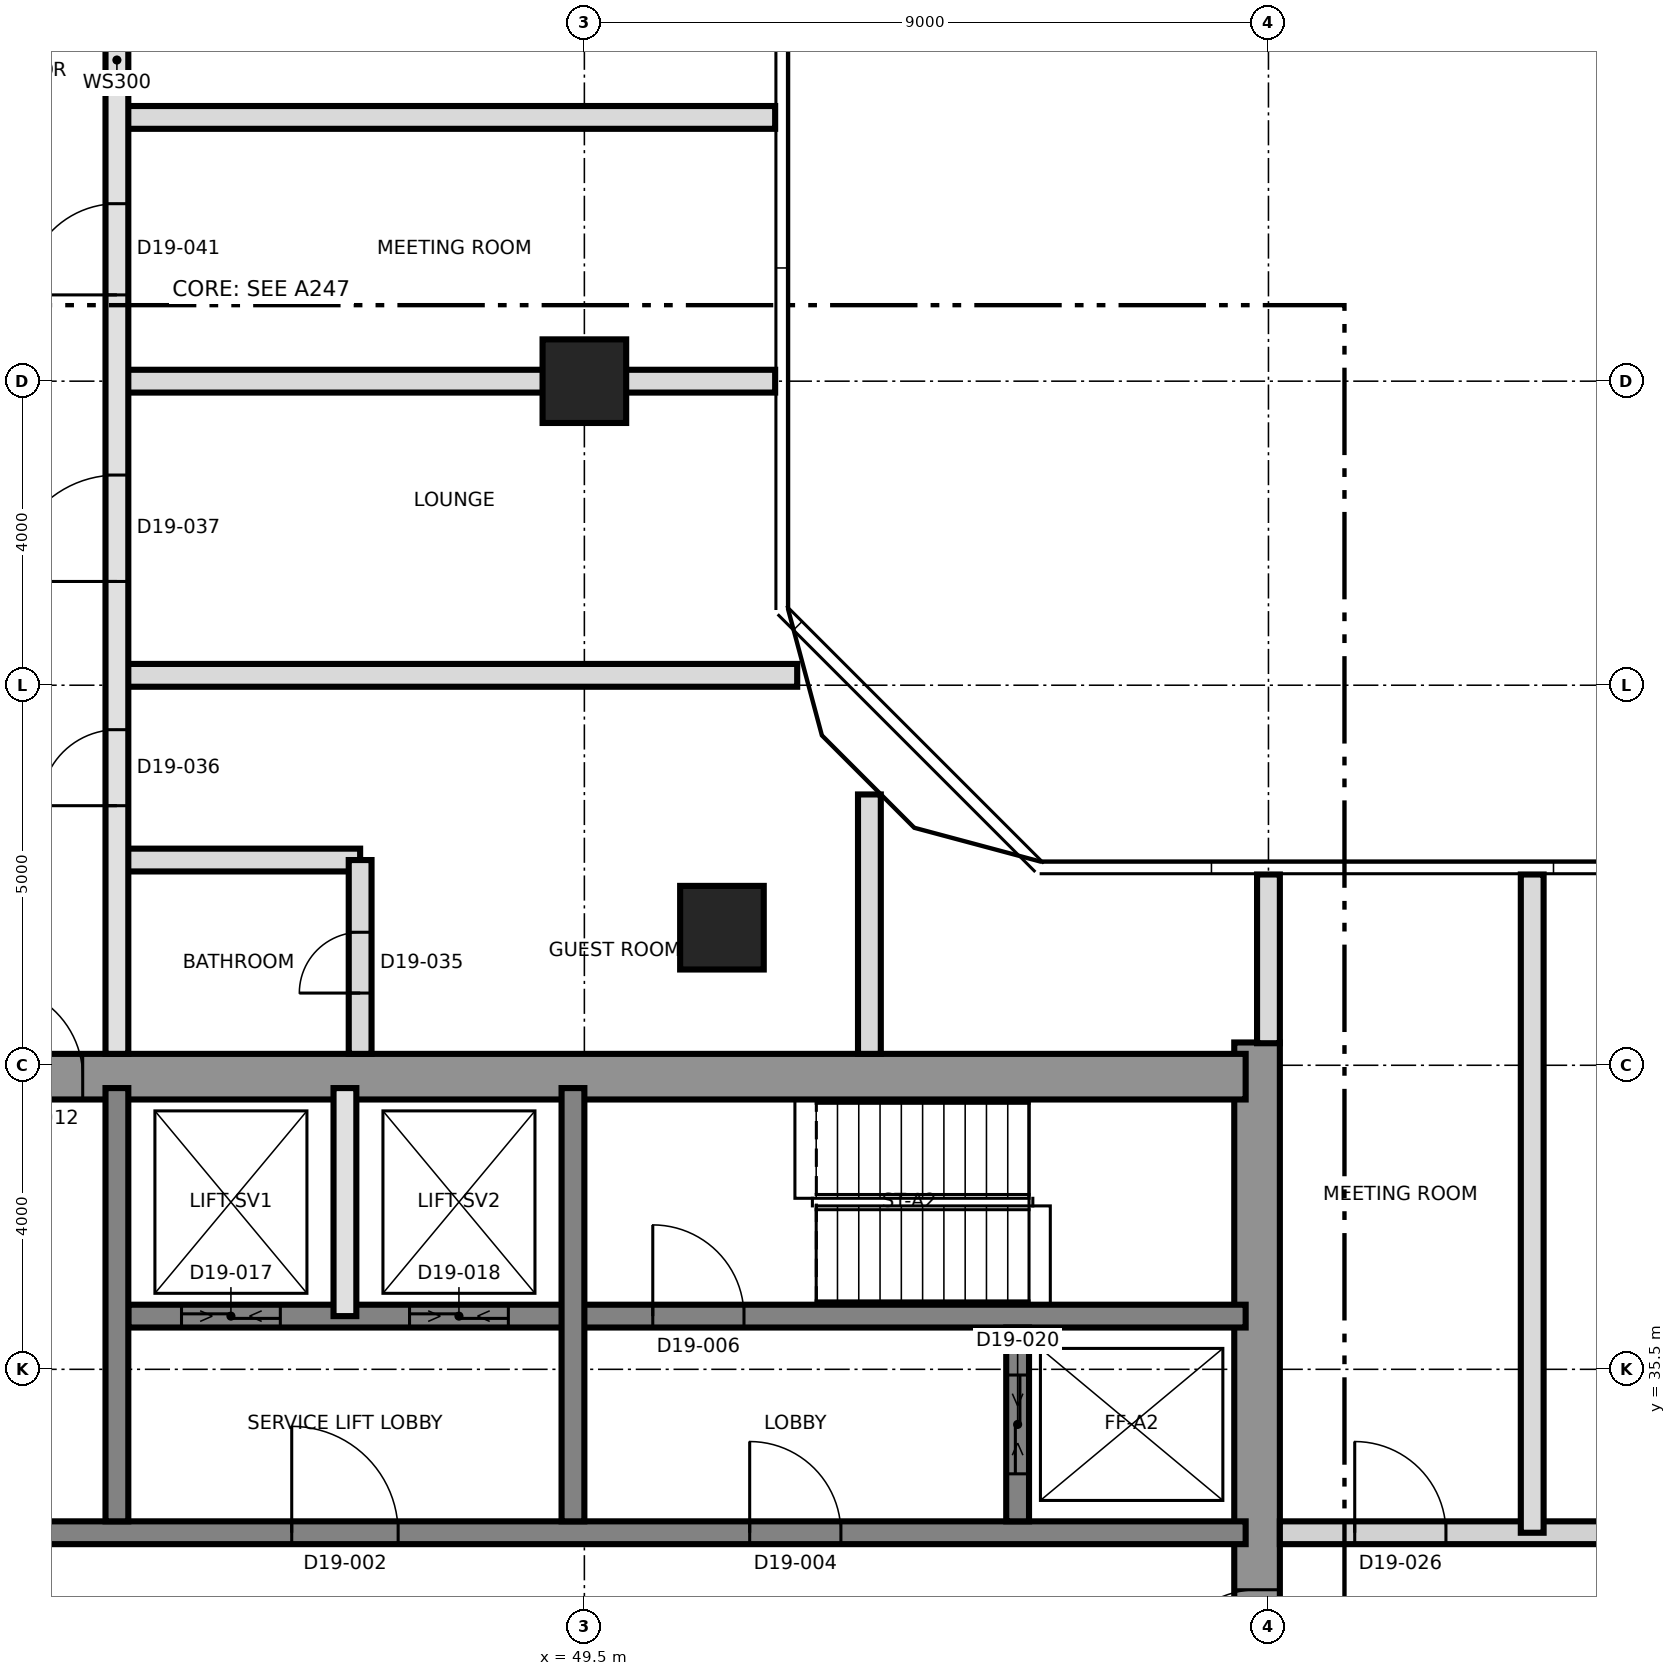
"""IFC4 building model, lengths in metres.
Left out: names, types, materials, properties, quantities, classifications, styles, units other than length and angle.
Written with IfcOpenShell. Run it as: python <this file> out.ifc"""

import sys

from ifc_helpers import new_model, si_unit, direction, frame, frame_2d, origin, origin_2d, place, context, subcontext, project, spatial, rectangle, extrude, element, fill, save


model = new_model("IFC4")
c1 = context("Model", 3, precision=1e-05, world=origin(), true_north=direction((0.0, 1.0)))
c2 = subcontext(c1, "Body", "Model", "MODEL_VIEW")
j1 = project(units=[si_unit("LENGTHUNIT", "METRE"), si_unit("PLANEANGLEUNIT", "RADIAN")], contexts=[c1])
p1 = place(None, origin())
s1 = spatial("IfcSite", under=j1, at=p1, CompositionType="ELEMENT")
p2 = place(p1, origin())
s2 = spatial("IfcBuilding", under=s1, at=p2, CompositionType="ELEMENT")
p3 = place(p2, frame((0.0, 0.0, 179.2)))
s3 = spatial("IfcBuildingStorey", under=s2, at=p3, CompositionType="ELEMENT", Elevation=179.2)
p4 = place(p3, frame((58.35, 21.2, 0.0), z_axis=(0.0, 0.0, 1.0), x_axis=(0.0, 1.0, 0.0)))
e1 = element("IfcWall", 1, at=p4, inside=s3, PredefinedType="SHEAR", context=c2, shape_type="SweptSolid", body=[
    extrude(rectangle(XDim=18.6, YDim=0.6, at=frame_2d((9.3, 0.0))), origin(), (0.0, 0.0, 1.0), 3.7),
])
p5 = place(p4, frame((10.2, 0.0, 0.0)))
e2 = element("IfcOpeningElement", 2, at=p5, cuts=e1, PredefinedType="OPENING", context=c2, shape_type="SweptSolid", body=[
    extrude(rectangle(XDim=1.2, YDim=2.1, at=frame_2d((0.6, 1.05))), frame((0.0, 0.31, 0.0), z_axis=(0.0, -1.0, 0.0), x_axis=(1.0, 0.0, 0.0)), (0.0, 0.0, 1.0), 0.62),
])
p6 = place(p3, frame((31.2, 39.35, 0.0), z_axis=(0.0, 0.0, 1.0), x_axis=(1.0, 0.0, 0.0)))
e3 = element("IfcWall", 3, at=p6, inside=s3, PredefinedType="SHEAR", context=c2, shape_type="SweptSolid", body=[
    extrude(rectangle(XDim=27.0, YDim=0.6, at=frame_2d((13.5, 0.0))), origin(), (0.0, 0.0, 1.0), 3.7),
])
p7 = place(p6, frame((10.5, 0.0, 0.0)))
e4 = element("IfcOpeningElement", 4, at=p7, cuts=e3, PredefinedType="OPENING", context=c2, shape_type="SweptSolid", body=[
    extrude(rectangle(XDim=1.2, YDim=2.1, at=frame_2d((0.6, 1.05))), frame((0.0, 0.31, 0.0), z_axis=(0.0, -1.0, 0.0), x_axis=(1.0, 0.0, 0.0)), (0.0, 0.0, 1.0), 0.62),
])
p8 = place(p3, frame((31.8, 33.35, 0.0), z_axis=(0.0, 0.0, 1.0), x_axis=(1.0, 0.0, 0.0)))
e5 = element("IfcWall", 5, at=p8, inside=s3, PredefinedType="SHEAR", context=c2, shape_type="SweptSolid", body=[
    extrude(rectangle(XDim=26.4, YDim=0.3, at=frame_2d((13.2, 0.0))), origin(), (0.0, 0.0, 1.0), 3.7),
])
p9 = place(p8, frame((13.85, 0.0, 0.0)))
e6 = element("IfcOpeningElement", 6, at=p9, cuts=e5, PredefinedType="OPENING", context=c2, shape_type="SweptSolid", body=[
    extrude(rectangle(XDim=1.4, YDim=2.1, at=frame_2d((0.7, 1.05))), frame((0.0, 0.16, 0.0), z_axis=(0.0, -1.0, 0.0), x_axis=(1.0, 0.0, 0.0)), (0.0, 0.0, 1.0), 0.32),
])
p10 = place(p8, frame((5.325, 0.0, 0.0)))
e7 = element("IfcOpeningElement", 7, at=p10, cuts=e5, PredefinedType="OPENING", context=c2, shape_type="SweptSolid", body=[
    extrude(rectangle(XDim=1.2, YDim=2.1, at=frame_2d((0.6, 1.05))), frame((0.0, 0.16, 0.0), z_axis=(0.0, -1.0, 0.0), x_axis=(1.0, 0.0, 0.0)), (0.0, 0.0, 1.0), 0.32),
])
p11 = place(p8, frame((19.875, 0.0, 0.0)))
e8 = element("IfcOpeningElement", 8, at=p11, cuts=e5, PredefinedType="OPENING", context=c2, shape_type="SweptSolid", body=[
    extrude(rectangle(XDim=1.2, YDim=2.1, at=frame_2d((0.6, 1.05))), frame((0.0, 0.16, 0.0), z_axis=(0.0, -1.0, 0.0), x_axis=(1.0, 0.0, 0.0)), (0.0, 0.0, 1.0), 0.32),
])
p12 = place(p3, frame((43.5, 36.2, 0.0), z_axis=(0.0, 0.0, 1.0), x_axis=(1.0, 0.0, 0.0)))
e9 = element("IfcWall", 9, at=p12, inside=s3, PredefinedType="SHEAR", context=c2, shape_type="SweptSolid", body=[
    extrude(rectangle(XDim=14.7, YDim=0.3, at=frame_2d((7.35, 0.0))), origin(), (0.0, 0.0, 1.0), 3.7),
])
p13 = place(p12, frame((6.9, 0.0, 0.0)))
e10 = element("IfcOpeningElement", 10, at=p13, cuts=e9, PredefinedType="OPENING", context=c2, shape_type="SweptSolid", body=[
    extrude(rectangle(XDim=1.2, YDim=2.1, at=frame_2d((0.6, 1.05))), frame((0.0, 0.16, 0.0), z_axis=(0.0, -1.0, 0.0), x_axis=(1.0, 0.0, 0.0)), (0.0, 0.0, 1.0), 0.32),
])
p14 = place(p12, frame((0.7, 0.0, 0.0)))
e11 = element("IfcOpeningElement", 11, at=p14, cuts=e9, PredefinedType="OPENING", context=c2, shape_type="SweptSolid", body=[
    extrude(rectangle(XDim=1.3, YDim=2.4, at=frame_2d((0.65, 1.2))), frame((0.0, 0.16, 0.0), z_axis=(0.0, -1.0, 0.0), x_axis=(1.0, 0.0, 0.0)), (0.0, 0.0, 1.0), 0.32),
])
p15 = place(p12, frame((3.7, 0.0, 0.0)))
e12 = element("IfcOpeningElement", 12, at=p15, cuts=e9, PredefinedType="OPENING", context=c2, shape_type="SweptSolid", body=[
    extrude(rectangle(XDim=1.3, YDim=2.4, at=frame_2d((0.65, 1.2))), frame((0.0, 0.16, 0.0), z_axis=(0.0, -1.0, 0.0), x_axis=(1.0, 0.0, 0.0)), (0.0, 0.0, 1.0), 0.32),
])
for number, where, z_axis, x_axis in (
    (13, (43.35, 33.5, 0.0), (0.0, 0.0, 1.0), (0.0, 1.0, 0.0)),
    (14, (49.35, 33.5, 0.0), (0.0, 0.0, 1.0), (0.0, 1.0, 0.0)),
):
    element("IfcWall", number, at=place(p3, frame(where, z_axis=z_axis, x_axis=x_axis)), inside=s3, PredefinedType="SHEAR", context=c2, shape_type="SweptSolid", body=[
        extrude(rectangle(XDim=5.7, YDim=0.3, at=frame_2d((2.85, 0.0))), origin(), (0.0, 0.0, 1.0), 3.7),
    ])
p16 = place(p3, frame((55.2, 33.5, 0.0), z_axis=(0.0, 0.0, 1.0), x_axis=(0.0, 1.0, 0.0)))
e15 = element("IfcWall", 15, at=p16, inside=s3, PredefinedType="SHEAR", context=c2, shape_type="SweptSolid", body=[
    extrude(rectangle(XDim=2.55, YDim=0.3, at=frame_2d((1.275, 0.0))), origin(), (0.0, 0.0, 1.0), 3.7),
])
p17 = place(p16, frame((0.625, 0.0, 0.0)))
e16 = element("IfcOpeningElement", 16, at=p17, cuts=e15, PredefinedType="OPENING", context=c2, shape_type="SweptSolid", body=[
    extrude(rectangle(XDim=1.3, YDim=2.4, at=frame_2d((0.65, 1.2))), frame((0.0, 0.16, 0.0), z_axis=(0.0, -1.0, 0.0), x_axis=(1.0, 0.0, 0.0)), (0.0, 0.0, 1.0), 0.32),
])
for number, where, z_axis, x_axis in (
    (17, (51.31, 41.31, 0.0), (0.0, 0.0, 1.0), (1.0, 0.0, 0.0)),
    (18, (49.5, 48.5, 0.0), (0.0, 0.0, 1.0), (1.0, 0.0, 0.0)),
):
    element("IfcColumn", number, at=place(p3, frame(where, z_axis=z_axis, x_axis=x_axis)), inside=s3, PredefinedType="COLUMN", context=c2, shape_type="SweptSolid", body=[
        extrude(rectangle(XDim=1.1, YDim=1.1, at=origin_2d()), origin(), (0.0, 0.0, 1.0), 3.7),
    ])
p18 = place(p3, frame((46.35, 36.2, 0.0), z_axis=(0.0, 0.0, 1.0), x_axis=(0.0, 1.0, 0.0)))
e19 = element("IfcWall", 19, at=p18, inside=s3, PredefinedType="SOLIDWALL", context=c2, shape_type="SweptSolid", body=[
    extrude(rectangle(XDim=3.0, YDim=0.3, at=frame_2d((1.5, 0.0))), origin(), (0.0, 0.0, 1.0), 3.4),
])
p19 = place(p3, frame((58.65, 33.35, 0.0), z_axis=(0.0, 0.0, 1.0), x_axis=(1.0, 0.0, 0.0)))
e20 = element("IfcWall", 20, at=p19, inside=s3, PredefinedType="PARTITIONING", context=c2, shape_type="SweptSolid", body=[
    extrude(rectangle(XDim=12.33, YDim=0.3, at=frame_2d((6.165, 0.0))), origin(), (0.0, 0.0, 1.0), 3.4),
])
p20 = place(p19, frame((0.985, 0.0, 0.0)))
e21 = element("IfcOpeningElement", 21, at=p20, cuts=e20, PredefinedType="OPENING", context=c2, shape_type="SweptSolid", body=[
    extrude(rectangle(XDim=1.2, YDim=2.1, at=frame_2d((0.6, 1.05))), frame((0.0, 0.16, 0.0), z_axis=(0.0, -1.0, 0.0), x_axis=(1.0, 0.0, 0.0)), (0.0, 0.0, 1.0), 0.32),
])
p21 = place(p19, frame((4.235, 0.0, 0.0)))
e22 = element("IfcOpeningElement", 22, at=p21, cuts=e20, PredefinedType="OPENING", context=c2, shape_type="SweptSolid", body=[
    extrude(rectangle(XDim=1.0, YDim=2.1, at=frame_2d((0.5, 1.05))), frame((0.0, 0.16, 0.0), z_axis=(0.0, -1.0, 0.0), x_axis=(1.0, 0.0, 0.0)), (0.0, 0.0, 1.0), 0.32),
])
p22 = place(p19, frame((9.985, 0.0, 0.0)))
e23 = element("IfcOpeningElement", 23, at=p22, cuts=e20, PredefinedType="OPENING", context=c2, shape_type="SweptSolid", body=[
    extrude(rectangle(XDim=1.2, YDim=2.1, at=frame_2d((0.6, 1.05))), frame((0.0, 0.16, 0.0), z_axis=(0.0, -1.0, 0.0), x_axis=(1.0, 0.0, 0.0)), (0.0, 0.0, 1.0), 0.32),
])
p23 = place(p3, frame((43.35, 42.2, 0.0), z_axis=(0.0, 0.0, 1.0), x_axis=(1.0, 0.0, 0.0)))
e24 = element("IfcWall", 24, at=p23, inside=s3, PredefinedType="PARTITIONING", context=c2, shape_type="SweptSolid", body=[
    extrude(rectangle(XDim=3.2, YDim=0.3, at=frame_2d((1.6, 0.0))), origin(), (0.0, 0.0, 1.0), 3.4),
])
p24 = place(p3, frame((43.35, 44.63, 0.0), z_axis=(0.0, 0.0, 1.0), x_axis=(1.0, 0.0, 0.0)))
e25 = element("IfcWall", 25, at=p24, inside=s3, PredefinedType="PARTITIONING", context=c2, shape_type="SweptSolid", body=[
    extrude(rectangle(XDim=8.95, YDim=0.3, at=frame_2d((4.475, 0.0))), origin(), (0.0, 0.0, 1.0), 3.4),
])
for number, where, z_axis, x_axis in (
    (26, (43.35, 48.5, 0.0), (0.0, 0.0, 1.0), (1.0, 0.0, 0.0)),
    (27, (43.35, 51.97, 0.0), (0.0, 0.0, 1.0), (1.0, 0.0, 0.0)),
):
    element("IfcWall", number, at=place(p3, frame(where, z_axis=z_axis, x_axis=x_axis)), inside=s3, PredefinedType="PARTITIONING", context=c2, shape_type="SweptSolid", body=[
        extrude(rectangle(XDim=8.66, YDim=0.3, at=frame_2d((4.33, 0.0))), origin(), (0.0, 0.0, 1.0), 3.4),
    ])
p25 = place(p3, frame((43.35, 39.65, 0.0), z_axis=(0.0, 0.0, 1.0), x_axis=(0.0, 1.0, 0.0)))
e28 = element("IfcWall", 28, at=p25, inside=s3, PredefinedType="SOLIDWALL", context=c2, shape_type="SweptSolid", body=[
    extrude(rectangle(XDim=26.15, YDim=0.3, at=frame_2d((13.075, 0.0))), origin(), (0.0, 0.0, 1.0), 3.4),
])
p26 = place(p25, frame((3.265, 0.0, 0.0)))
e29 = element("IfcOpeningElement", 29, at=p26, cuts=e28, PredefinedType="OPENING", context=c2, shape_type="SweptSolid", body=[
    extrude(rectangle(XDim=1.0, YDim=2.1, at=frame_2d((0.5, 1.05))), frame((0.0, 0.16, 0.0), z_axis=(0.0, -1.0, 0.0), x_axis=(1.0, 0.0, 0.0)), (0.0, 0.0, 1.0), 0.32),
])
p27 = place(p25, frame((6.215, 0.0, 0.0)))
e30 = element("IfcOpeningElement", 30, at=p27, cuts=e28, PredefinedType="OPENING", context=c2, shape_type="SweptSolid", body=[
    extrude(rectangle(XDim=1.4, YDim=2.1, at=frame_2d((0.7, 1.05))), frame((0.0, 0.16, 0.0), z_axis=(0.0, -1.0, 0.0), x_axis=(1.0, 0.0, 0.0)), (0.0, 0.0, 1.0), 0.32),
])
p28 = place(p25, frame((9.985, 0.0, 0.0)))
e31 = element("IfcOpeningElement", 31, at=p28, cuts=e28, PredefinedType="OPENING", context=c2, shape_type="SweptSolid", body=[
    extrude(rectangle(XDim=1.2, YDim=2.1, at=frame_2d((0.6, 1.05))), frame((0.0, 0.16, 0.0), z_axis=(0.0, -1.0, 0.0), x_axis=(1.0, 0.0, 0.0)), (0.0, 0.0, 1.0), 0.32),
])
p29 = place(p25, frame((13.235, 0.0, 0.0)))
e32 = element("IfcOpeningElement", 32, at=p29, cuts=e28, PredefinedType="OPENING", context=c2, shape_type="SweptSolid", body=[
    extrude(rectangle(XDim=1.0, YDim=2.1, at=frame_2d((0.5, 1.05))), frame((0.0, 0.16, 0.0), z_axis=(0.0, -1.0, 0.0), x_axis=(1.0, 0.0, 0.0)), (0.0, 0.0, 1.0), 0.32),
])
p30 = place(p25, frame((21.4, 0.0, 0.0)))
e33 = element("IfcOpeningElement", 33, at=p30, cuts=e28, PredefinedType="OPENING", context=c2, shape_type="SweptSolid", body=[
    extrude(rectangle(XDim=1.0, YDim=2.4, at=frame_2d((0.5, 1.2))), frame((0.0, 0.16, 0.0), z_axis=(0.0, -1.0, 0.0), x_axis=(1.0, 0.0, 0.0)), (0.0, 0.0, 1.0), 0.32),
])
p31 = place(p3, frame((46.55, 39.65, 0.0), z_axis=(0.0, 0.0, 1.0), x_axis=(0.0, 1.0, 0.0)))
e34 = element("IfcWall", 34, at=p31, inside=s3, PredefinedType="PARTITIONING", context=c2, shape_type="SweptSolid", body=[
    extrude(rectangle(XDim=2.55, YDim=0.3, at=frame_2d((1.275, 0.0))), origin(), (0.0, 0.0, 1.0), 3.4),
])
p32 = place(p31, frame((0.8, 0.0, 0.0)))
e35 = element("IfcOpeningElement", 35, at=p32, cuts=e34, PredefinedType="OPENING", context=c2, shape_type="SweptSolid", body=[
    extrude(rectangle(XDim=0.8, YDim=2.1, at=frame_2d((0.4, 1.05))), frame((0.0, 0.16, 0.0), z_axis=(0.0, -1.0, 0.0), x_axis=(1.0, 0.0, 0.0)), (0.0, 0.0, 1.0), 0.32),
])
p33 = place(p3, frame((53.25, 39.65, 0.0), z_axis=(0.0, 0.0, 1.0), x_axis=(0.0, 1.0, 0.0)))
e36 = element("IfcWall", 36, at=p33, inside=s3, PredefinedType="PARTITIONING", context=c2, shape_type="SweptSolid", body=[
    extrude(rectangle(XDim=3.413, YDim=0.3, at=frame_2d((1.707, 0.0))), origin(), (0.0, 0.0, 1.0), 3.4),
])
p34 = place(p3, frame((58.5, 39.79, 0.0), z_axis=(0.0, 0.0, 1.0), x_axis=(0.0, 1.0, 0.0)))
e37 = element("IfcWall", 37, at=p34, inside=s3, PredefinedType="PARTITIONING", context=c2, shape_type="SweptSolid", body=[
    extrude(rectangle(XDim=2.22, YDim=0.3, at=frame_2d((1.11, 0.0))), origin(), (0.0, 0.0, 1.0), 3.4),
])
p35 = place(p3, frame((61.97, 33.35, 0.0), z_axis=(0.0, 0.0, 1.0), x_axis=(0.0, 1.0, 0.0)))
e38 = element("IfcWall", 38, at=p35, inside=s3, PredefinedType="PARTITIONING", context=c2, shape_type="SweptSolid", body=[
    extrude(rectangle(XDim=8.66, YDim=0.3, at=frame_2d((4.33, 0.0))), origin(), (0.0, 0.0, 1.0), 3.4),
])
p36 = place(p9, origin())
e39 = element("IfcDoor", 39, at=p36, inside=s3, OperationType="SINGLE_SWING_RIGHT", PredefinedType="DOOR", context=c2, shape_type="SweptSolid", body=[
    extrude(rectangle(XDim=1.4, YDim=2.1, at=frame_2d((0.7, 1.05))), frame((0.0, 0.025, 0.0), z_axis=(0.0, -1.0, 0.0), x_axis=(1.0, 0.0, 0.0)), (0.0, 0.0, 1.0), 0.05),
])
fill(e6, e39)
p37 = place(p11, origin())
e40 = element("IfcDoor", 40, at=p37, inside=s3, OperationType="SINGLE_SWING_RIGHT", PredefinedType="DOOR", context=c2, shape_type="SweptSolid", body=[
    extrude(rectangle(XDim=1.2, YDim=2.1, at=frame_2d((0.6, 1.05))), frame((0.0, 0.025, 0.0), z_axis=(0.0, -1.0, 0.0), x_axis=(1.0, 0.0, 0.0)), (0.0, 0.0, 1.0), 0.05),
])
fill(e8, e40)
p38 = place(p13, origin())
e41 = element("IfcDoor", 41, at=p38, inside=s3, OperationType="SINGLE_SWING_LEFT", PredefinedType="DOOR", context=c2, shape_type="SweptSolid", body=[
    extrude(rectangle(XDim=1.2, YDim=2.1, at=frame_2d((0.6, 1.05))), frame((0.0, 0.025, 0.0), z_axis=(0.0, -1.0, 0.0), x_axis=(1.0, 0.0, 0.0)), (0.0, 0.0, 1.0), 0.05),
])
fill(e10, e41)
p39 = place(p5, origin())
e42 = element("IfcDoor", 42, at=p39, inside=s3, OperationType="SINGLE_SWING_LEFT", PredefinedType="DOOR", context=c2, shape_type="SweptSolid", body=[
    extrude(rectangle(XDim=1.2, YDim=2.1, at=frame_2d((0.6, 1.05))), frame((0.0, 0.025, 0.0), z_axis=(0.0, -1.0, 0.0), x_axis=(1.0, 0.0, 0.0)), (0.0, 0.0, 1.0), 0.05),
])
fill(e2, e42)
p40 = place(p7, origin())
e43 = element("IfcDoor", 43, at=p40, inside=s3, OperationType="SINGLE_SWING_RIGHT", PredefinedType="DOOR", context=c2, shape_type="SweptSolid", body=[
    extrude(rectangle(XDim=1.2, YDim=2.1, at=frame_2d((0.6, 1.05))), frame((0.0, 0.025, 0.0), z_axis=(0.0, -1.0, 0.0), x_axis=(1.0, 0.0, 0.0)), (0.0, 0.0, 1.0), 0.05),
])
fill(e4, e43)
p41 = place(p14, origin())
e44 = element("IfcDoor", 44, at=p41, inside=s3, OperationType="SLIDING_TO_LEFT", PredefinedType="DOOR", context=c2, shape_type="SweptSolid", body=[
    extrude(rectangle(XDim=1.3, YDim=2.4, at=frame_2d((0.65, 1.2))), frame((0.0, 0.025, 0.0), z_axis=(0.0, -1.0, 0.0), x_axis=(1.0, 0.0, 0.0)), (0.0, 0.0, 1.0), 0.05),
])
fill(e11, e44)
p42 = place(p15, origin())
e45 = element("IfcDoor", 45, at=p42, inside=s3, OperationType="SLIDING_TO_LEFT", PredefinedType="DOOR", context=c2, shape_type="SweptSolid", body=[
    extrude(rectangle(XDim=1.3, YDim=2.4, at=frame_2d((0.65, 1.2))), frame((0.0, 0.025, 0.0), z_axis=(0.0, -1.0, 0.0), x_axis=(1.0, 0.0, 0.0)), (0.0, 0.0, 1.0), 0.05),
])
fill(e12, e45)
p43 = place(p17, origin())
e46 = element("IfcDoor", 46, at=p43, inside=s3, OperationType="SLIDING_TO_LEFT", PredefinedType="DOOR", context=c2, shape_type="SweptSolid", body=[
    extrude(rectangle(XDim=1.3, YDim=2.4, at=frame_2d((0.65, 1.2))), frame((0.0, 0.025, 0.0), z_axis=(0.0, -1.0, 0.0), x_axis=(1.0, 0.0, 0.0)), (0.0, 0.0, 1.0), 0.05),
])
fill(e16, e46)
p44 = place(p20, origin())
e47 = element("IfcDoor", 47, at=p44, inside=s3, OperationType="SINGLE_SWING_LEFT", PredefinedType="DOOR", context=c2, shape_type="SweptSolid", body=[
    extrude(rectangle(XDim=1.2, YDim=2.1, at=frame_2d((0.6, 1.05))), frame((0.0, 0.025, 0.0), z_axis=(0.0, -1.0, 0.0), x_axis=(1.0, 0.0, 0.0)), (0.0, 0.0, 1.0), 0.05),
])
fill(e21, e47)
p45 = place(p32, origin())
e48 = element("IfcDoor", 48, at=p45, inside=s3, OperationType="SINGLE_SWING_LEFT", PredefinedType="DOOR", context=c2, shape_type="SweptSolid", body=[
    extrude(rectangle(XDim=0.8, YDim=2.1, at=frame_2d((0.4, 1.05))), frame((0.0, 0.025, 0.0), z_axis=(0.0, -1.0, 0.0), x_axis=(1.0, 0.0, 0.0)), (0.0, 0.0, 1.0), 0.05),
])
fill(e35, e48)
p46 = place(p26, origin())
e49 = element("IfcDoor", 49, at=p46, inside=s3, OperationType="SINGLE_SWING_RIGHT", PredefinedType="DOOR", context=c2, shape_type="SweptSolid", body=[
    extrude(rectangle(XDim=1.0, YDim=2.1, at=frame_2d((0.5, 1.05))), frame((0.0, 0.025, 0.0), z_axis=(0.0, -1.0, 0.0), x_axis=(1.0, 0.0, 0.0)), (0.0, 0.0, 1.0), 0.05),
])
fill(e29, e49)
p47 = place(p27, origin())
e50 = element("IfcDoor", 50, at=p47, inside=s3, OperationType="SINGLE_SWING_LEFT", PredefinedType="DOOR", context=c2, shape_type="SweptSolid", body=[
    extrude(rectangle(XDim=1.4, YDim=2.1, at=frame_2d((0.7, 1.05))), frame((0.0, 0.025, 0.0), z_axis=(0.0, -1.0, 0.0), x_axis=(1.0, 0.0, 0.0)), (0.0, 0.0, 1.0), 0.05),
])
fill(e30, e50)
p48 = place(p28, origin())
e51 = element("IfcDoor", 51, at=p48, inside=s3, OperationType="SINGLE_SWING_RIGHT", PredefinedType="DOOR", context=c2, shape_type="SweptSolid", body=[
    extrude(rectangle(XDim=1.2, YDim=2.1, at=frame_2d((0.6, 1.05))), frame((0.0, 0.025, 0.0), z_axis=(0.0, -1.0, 0.0), x_axis=(1.0, 0.0, 0.0)), (0.0, 0.0, 1.0), 0.05),
])
fill(e31, e51)
save(model, sys.argv[1])
